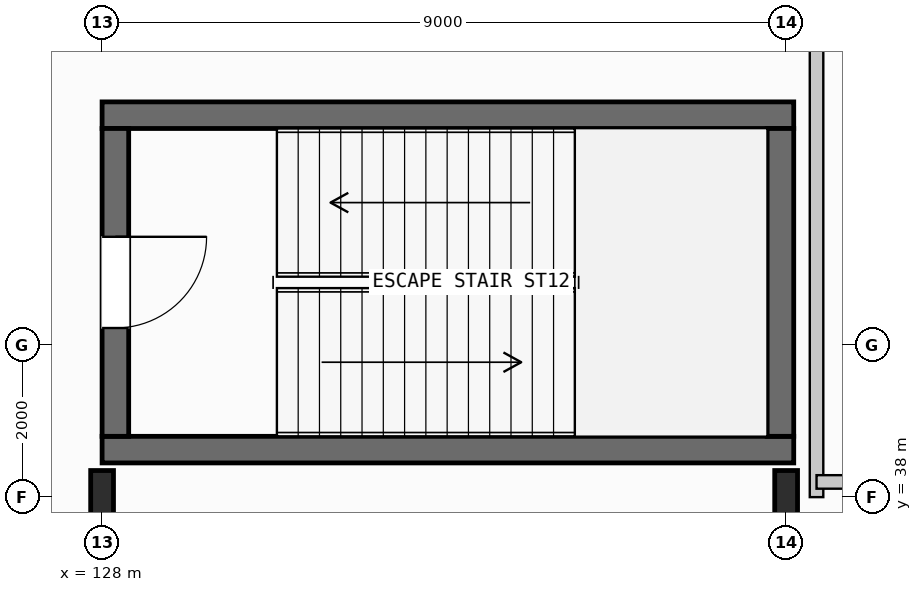
"""IFC4 building model, lengths in metres.
Left out: names, types, materials, properties, quantities, classifications, styles, units other than length and angle.
Written with IfcOpenShell. Run it as: python <this file> out.ifc"""

import sys

from ifc_helpers import new_model, si_unit, direction, frame, frame_2d, origin, origin_2d, place, context, subcontext, project, spatial, rectangle, i_section, extrude, element, fill, save


model = new_model("IFC4")
c1 = context("Model", 3, precision=1e-05, world=origin(), true_north=direction((0.0, 1.0)))
c2 = subcontext(c1, "Body", "Model", "MODEL_VIEW")
j1 = project(units=[si_unit("LENGTHUNIT", "METRE"), si_unit("PLANEANGLEUNIT", "RADIAN")], contexts=[c1])
p1 = place(None, origin())
s1 = spatial("IfcSite", under=j1, at=p1, CompositionType="ELEMENT")
p2 = place(p1, origin())
s2 = spatial("IfcBuilding", under=s1, at=p2, CompositionType="ELEMENT")
p3 = place(p2, frame((0.0, 0.0, -5.4)))
s3 = spatial("IfcBuildingStorey", under=s2, at=p3, CompositionType="ELEMENT", Elevation=-5.4)
for number, where, z_axis, x_axis in (
    (1, (128.0, 38.0, 0.0), (0.0, 0.0, 1.0), (1.0, 0.0, 0.0)),
    (2, (137.0, 38.0, 0.0), (0.0, 0.0, 1.0), (1.0, 0.0, 0.0)),
):
    element("IfcColumn", number, at=place(p3, frame(where, z_axis=z_axis, x_axis=x_axis)), inside=s3, PredefinedType="COLUMN", context=c2, shape_type="SweptSolid", body=[
        extrude(i_section(OverallWidth=0.3, OverallDepth=0.7, WebThickness=0.017, FlangeThickness=0.032, FilletRadius=0.027, at=origin_2d()), origin(), (0.0, 0.0, 1.0), 5.4),
    ])
for number, where, z_axis, x_axis in (
    (3, (128.0, 38.625, 0.0), (0.0, 0.0, 1.0), (1.0, 0.0, 0.0)),
    (4, (128.0, 43.025, 0.0), (0.0, 0.0, 1.0), (1.0, 0.0, 0.0)),
):
    element("IfcWall", number, at=place(p3, frame(where, z_axis=z_axis, x_axis=x_axis)), inside=s3, PredefinedType="SHEAR", context=c2, shape_type="SweptSolid", body=[
        extrude(rectangle(XDim=9.1, YDim=0.35, at=frame_2d((4.55, 0.0))), origin(), (0.0, 0.0, 1.0), 5.4),
    ])
p4 = place(p3, frame((128.175, 38.8, 0.0), z_axis=(0.0, 0.0, 1.0), x_axis=(0.0, 1.0, 0.0)))
e5 = element("IfcWall", 5, at=p4, inside=s3, PredefinedType="SHEAR", context=c2, shape_type="SweptSolid", body=[
    extrude(rectangle(XDim=4.05, YDim=0.35, at=frame_2d((2.025, 0.0))), origin(), (0.0, 0.0, 1.0), 5.4),
])
p5 = place(p4, frame((1.425, 0.0, 0.0)))
e6 = element("IfcOpeningElement", 6, at=p5, cuts=e5, PredefinedType="OPENING", context=c2, shape_type="SweptSolid", body=[
    extrude(rectangle(XDim=1.2, YDim=2.2, at=frame_2d((0.6, 1.1))), frame((0.0, 0.185, 0.0), z_axis=(0.0, -1.0, 0.0), x_axis=(1.0, 0.0, 0.0)), (0.0, 0.0, 1.0), 0.37),
])
p6 = place(p3, frame((136.925, 38.8, 0.0), z_axis=(0.0, 0.0, 1.0), x_axis=(0.0, 1.0, 0.0)))
e7 = element("IfcWall", 7, at=p6, inside=s3, PredefinedType="SHEAR", context=c2, shape_type="SweptSolid", body=[
    extrude(rectangle(XDim=4.05, YDim=0.35, at=frame_2d((2.025, 0.0))), origin(), (0.0, 0.0, 1.0), 5.4),
])
p7 = place(p3, frame((137.4, 38.0, 0.0), z_axis=(0.0, 0.0, 1.0), x_axis=(0.0, 1.0, 0.0)))
e8 = element("IfcWall", 8, at=p7, inside=s3, PredefinedType="PARTITIONING", context=c2, shape_type="SweptSolid", body=[
    extrude(rectangle(XDim=8.0, YDim=0.178, at=frame_2d((4.0, 0.0))), origin(), (0.0, 0.0, 1.0), 4.373),
])
p8 = place(p3, frame((137.4, 38.2, 0.0), z_axis=(0.0, 0.0, 1.0), x_axis=(1.0, 0.0, 0.0)))
e9 = element("IfcWall", 9, at=p8, inside=s3, PredefinedType="PARTITIONING", context=c2, shape_type="SweptSolid", body=[
    extrude(rectangle(XDim=8.4, YDim=0.178, at=frame_2d((4.2, 0.0))), origin(), (0.0, 0.0, 1.0), 4.373),
])
p9 = place(p5, frame((1.2, 0.0, 0.0), z_axis=(0.0, 0.0, 1.0), x_axis=(-1.0, 0.0, 0.0)))
e10 = element("IfcDoor", 10, at=p9, inside=s3, OperationType="SINGLE_SWING_LEFT", PredefinedType="DOOR", context=c2, shape_type="SweptSolid", body=[
    extrude(rectangle(XDim=1.2, YDim=2.2, at=frame_2d((0.6, 1.1))), frame((0.0, 0.025, 0.0), z_axis=(0.0, -1.0, 0.0), x_axis=(1.0, 0.0, 0.0)), (0.0, 0.0, 1.0), 0.05),
])
fill(e6, e10)
save(model, sys.argv[1])
